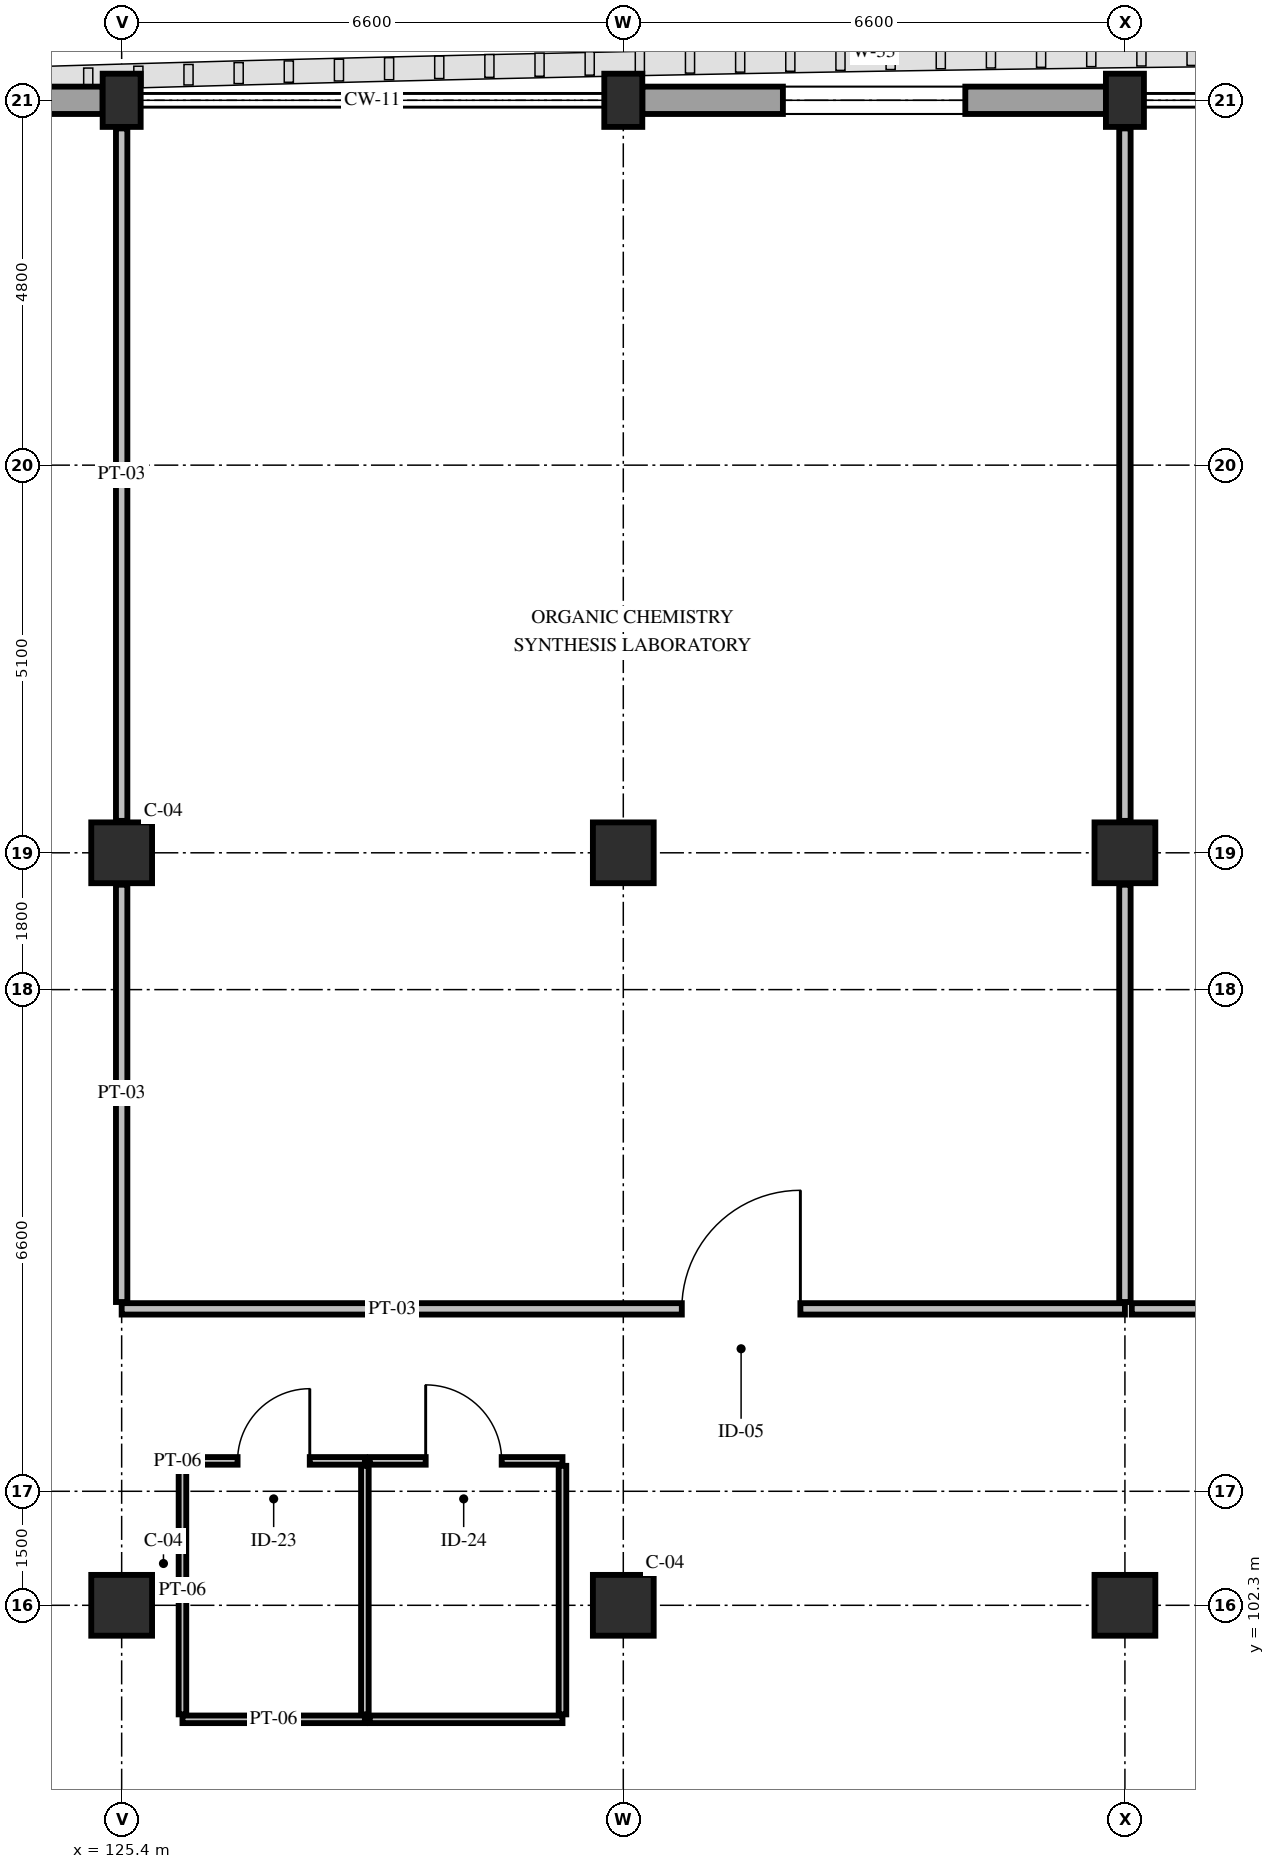
"""IFC4 building model, lengths in metres.
Left out: names, types, materials, properties, quantities, classifications, styles, units other than length and angle.
Written with IfcOpenShell. Run it as: python <this file> out.ifc"""

import sys

from ifc_helpers import new_model, si_unit, direction, frame, frame_2d, origin, origin_2d, place, context, subcontext, project, spatial, rectangle, extrude, element, fill, save


model = new_model("IFC4")
c1 = context("Model", 3, precision=1e-05, world=origin(), true_north=direction((0.0, 1.0)))
c2 = subcontext(c1, "Body", "Model", "MODEL_VIEW")
j1 = project(units=[si_unit("LENGTHUNIT", "METRE"), si_unit("PLANEANGLEUNIT", "RADIAN")], contexts=[c1])
p1 = place(None, origin())
s1 = spatial("IfcSite", under=j1, at=p1, CompositionType="ELEMENT")
p2 = place(p1, origin())
s2 = spatial("IfcBuilding", under=s1, at=p2, CompositionType="ELEMENT")
p3 = place(p2, frame((0.0, 0.0, 5.4)))
s3 = spatial("IfcBuildingStorey", under=s2, at=p3, CompositionType="ELEMENT", Elevation=5.4)
for number, where, z_axis, x_axis in (
    (1, (125.4, 102.3, 0.0), (0.0, 0.0, 1.0), (1.0, 0.0, 0.0)),
    (2, (125.4, 112.2, 0.0), (0.0, 0.0, 1.0), (1.0, 0.0, 0.0)),
):
    element("IfcColumn", number, at=place(p3, frame(where, z_axis=z_axis, x_axis=x_axis)), inside=s3, PredefinedType="COLUMN", context=c2, shape_type="SweptSolid", body=[
        extrude(rectangle(XDim=0.8, YDim=0.8, at=origin_2d()), origin(), (0.0, 0.0, 1.0), 4.8),
    ])
p4 = place(p3, frame((125.4, 122.1, 0.0), z_axis=(0.0, 0.0, 1.0), x_axis=(1.0, 0.0, 0.0)))
e3 = element("IfcColumn", 3, at=p4, inside=s3, PredefinedType="PILASTER", context=c2, shape_type="SweptSolid", body=[
    extrude(rectangle(XDim=0.5, YDim=0.7, at=origin_2d()), origin(), (0.0, 0.0, 1.0), 4.8),
])
for number, where, z_axis, x_axis in (
    (4, (132.0, 102.3, 0.0), (0.0, 0.0, 1.0), (1.0, 0.0, 0.0)),
    (5, (132.0, 112.2, 0.0), (0.0, 0.0, 1.0), (1.0, 0.0, 0.0)),
):
    element("IfcColumn", number, at=place(p3, frame(where, z_axis=z_axis, x_axis=x_axis)), inside=s3, PredefinedType="COLUMN", context=c2, shape_type="SweptSolid", body=[
        extrude(rectangle(XDim=0.8, YDim=0.8, at=origin_2d()), origin(), (0.0, 0.0, 1.0), 4.8),
    ])
p5 = place(p3, frame((132.0, 122.1, 0.0), z_axis=(0.0, 0.0, 1.0), x_axis=(1.0, 0.0, 0.0)))
e6 = element("IfcColumn", 6, at=p5, inside=s3, PredefinedType="PILASTER", context=c2, shape_type="SweptSolid", body=[
    extrude(rectangle(XDim=0.5, YDim=0.7, at=origin_2d()), origin(), (0.0, 0.0, 1.0), 4.8),
])
for number, where, z_axis, x_axis in (
    (7, (138.6, 102.3, 0.0), (0.0, 0.0, 1.0), (1.0, 0.0, 0.0)),
    (8, (138.6, 112.2, 0.0), (0.0, 0.0, 1.0), (1.0, 0.0, 0.0)),
):
    element("IfcColumn", number, at=place(p3, frame(where, z_axis=z_axis, x_axis=x_axis)), inside=s3, PredefinedType="COLUMN", context=c2, shape_type="SweptSolid", body=[
        extrude(rectangle(XDim=0.8, YDim=0.8, at=origin_2d()), origin(), (0.0, 0.0, 1.0), 4.8),
    ])
p6 = place(p3, frame((138.6, 122.1, 0.0), z_axis=(0.0, 0.0, 1.0), x_axis=(1.0, 0.0, 0.0)))
e9 = element("IfcColumn", 9, at=p6, inside=s3, PredefinedType="PILASTER", context=c2, shape_type="SweptSolid", body=[
    extrude(rectangle(XDim=0.5, YDim=0.7, at=origin_2d()), origin(), (0.0, 0.0, 1.0), 4.8),
])
p7 = place(p3, frame((119.15, 122.1, 0.0), z_axis=(0.0, 0.0, 1.0), x_axis=(1.0, 0.0, 0.0)))
e10 = element("IfcWall", 10, at=p7, inside=s3, PredefinedType="STANDARD", context=c2, shape_type="SweptSolid", body=[
    extrude(rectangle(XDim=6.0, YDim=0.36, at=frame_2d((3.0, 0.0))), origin(), (0.0, 0.0, 1.0), 3.78),
])
p8 = place(p7, frame((1.8, 0.0, 0.85)))
e11 = element("IfcOpeningElement", 11, at=p8, cuts=e10, PredefinedType="OPENING", context=c2, shape_type="SweptSolid", body=[
    extrude(rectangle(XDim=2.4, YDim=1.88, at=frame_2d((1.2, 0.94))), frame((0.0, 0.195, 0.0), z_axis=(0.0, -1.0, 0.0), x_axis=(1.0, 0.0, 0.0)), (0.0, 0.0, 1.0), 0.39),
])
p9 = place(p3, frame((132.25, 122.1, 0.0), z_axis=(0.0, 0.0, 1.0), x_axis=(1.0, 0.0, 0.0)))
e12 = element("IfcWall", 12, at=p9, inside=s3, PredefinedType="STANDARD", context=c2, shape_type="SweptSolid", body=[
    extrude(rectangle(XDim=6.1, YDim=0.36, at=frame_2d((3.05, 0.0))), origin(), (0.0, 0.0, 1.0), 3.78),
])
p10 = place(p9, frame((1.85, 0.0, 0.85)))
e13 = element("IfcOpeningElement", 13, at=p10, cuts=e12, PredefinedType="OPENING", context=c2, shape_type="SweptSolid", body=[
    extrude(rectangle(XDim=2.4, YDim=1.88, at=frame_2d((1.2, 0.94))), frame((0.0, 0.195, 0.0), z_axis=(0.0, -1.0, 0.0), x_axis=(1.0, 0.0, 0.0)), (0.0, 0.0, 1.0), 0.39),
])
p11 = place(p3, frame((126.2, 100.8, 0.0), z_axis=(0.0, 0.0, 1.0), x_axis=(1.0, 0.0, 0.0)))
e14 = element("IfcWall", 14, at=p11, inside=s3, PredefinedType="PARTITIONING", context=c2, shape_type="SweptSolid", body=[
    extrude(rectangle(XDim=2.4, YDim=0.1, at=frame_2d((1.2, 0.0))), origin(), (0.0, 0.0, 1.0), 4.44),
])
p12 = place(p3, frame((126.2, 104.2, 0.0), z_axis=(0.0, 0.0, 1.0), x_axis=(1.0, 0.0, 0.0)))
e15 = element("IfcWall", 15, at=p12, inside=s3, PredefinedType="PARTITIONING", context=c2, shape_type="SweptSolid", body=[
    extrude(rectangle(XDim=2.4, YDim=0.1, at=frame_2d((1.2, 0.0))), origin(), (0.0, 0.0, 1.0), 4.245),
])
p13 = place(p12, frame((0.725, 0.0, 0.0)))
e16 = element("IfcOpeningElement", 16, at=p13, cuts=e15, PredefinedType="OPENING", context=c2, shape_type="SweptSolid", body=[
    extrude(rectangle(XDim=0.95, YDim=2.15, at=frame_2d((0.475, 1.075))), frame((0.0, 0.065, 0.0), z_axis=(0.0, -1.0, 0.0), x_axis=(1.0, 0.0, 0.0)), (0.0, 0.0, 1.0), 0.13),
])
for number, where, z_axis, x_axis in (
    (17, (126.2, 100.865, 0.0), (0.0, 0.0, 1.0), (0.0, 1.0, 0.0)),
    (18, (128.6, 100.865, 0.0), (0.0, 0.0, 1.0), (0.0, 1.0, 0.0)),
):
    element("IfcWall", number, at=place(p3, frame(where, z_axis=z_axis, x_axis=x_axis)), inside=s3, PredefinedType="PARTITIONING", context=c2, shape_type="SweptSolid", body=[
        extrude(rectangle(XDim=3.27, YDim=0.1, at=frame_2d((1.635, 0.0))), origin(), (0.0, 0.0, 1.0), 4.065),
    ])
p14 = place(p3, frame((128.665, 100.8, 0.0), z_axis=(0.0, 0.0, 1.0), x_axis=(1.0, 0.0, 0.0)))
e19 = element("IfcWall", 19, at=p14, inside=s3, PredefinedType="PARTITIONING", context=c2, shape_type="SweptSolid", body=[
    extrude(rectangle(XDim=2.535, YDim=0.1, at=frame_2d((1.268, 0.0))), origin(), (0.0, 0.0, 1.0), 4.44),
])
p15 = place(p3, frame((128.665, 104.2, 0.0), z_axis=(0.0, 0.0, 1.0), x_axis=(1.0, 0.0, 0.0)))
e20 = element("IfcWall", 20, at=p15, inside=s3, PredefinedType="PARTITIONING", context=c2, shape_type="SweptSolid", body=[
    extrude(rectangle(XDim=2.535, YDim=0.1, at=frame_2d((1.268, 0.0))), origin(), (0.0, 0.0, 1.0), 4.245),
])
p16 = place(p15, frame((0.735, 0.0, 0.0)))
e21 = element("IfcOpeningElement", 21, at=p16, cuts=e20, PredefinedType="OPENING", context=c2, shape_type="SweptSolid", body=[
    extrude(rectangle(XDim=1.0, YDim=2.15, at=frame_2d((0.5, 1.075))), frame((0.0, 0.065, 0.0), z_axis=(0.0, -1.0, 0.0), x_axis=(1.0, 0.0, 0.0)), (0.0, 0.0, 1.0), 0.13),
])
p17 = place(p3, frame((131.2, 100.865, 0.0), z_axis=(0.0, 0.0, 1.0), x_axis=(0.0, 1.0, 0.0)))
e22 = element("IfcWall", 22, at=p17, inside=s3, PredefinedType="PARTITIONING", context=c2, shape_type="SweptSolid", body=[
    extrude(rectangle(XDim=3.27, YDim=0.1, at=frame_2d((1.635, 0.0))), origin(), (0.0, 0.0, 1.0), 4.065),
])
p18 = place(p3, frame((125.4, 106.2, 0.0), z_axis=(0.0, 0.0, 1.0), x_axis=(1.0, 0.0, 0.0)))
e23 = element("IfcWall", 23, at=p18, inside=s3, PredefinedType="PARTITIONING", context=c2, shape_type="SweptSolid", body=[
    extrude(rectangle(XDim=13.2, YDim=0.15, at=frame_2d((6.6, 0.0))), origin(), (0.0, 0.0, 1.0), 3.78),
])
p19 = place(p18, frame((7.37, 0.0, 0.0)))
e24 = element("IfcOpeningElement", 24, at=p19, cuts=e23, PredefinedType="OPENING", context=c2, shape_type="SweptSolid", body=[
    extrude(rectangle(XDim=1.56, YDim=2.3, at=frame_2d((0.78, 1.15))), frame((0.0, 0.09, 0.0), z_axis=(0.0, -1.0, 0.0), x_axis=(1.0, 0.0, 0.0)), (0.0, 0.0, 1.0), 0.18),
])
p20 = place(p3, frame((125.4, 106.29, 0.0), z_axis=(0.0, 0.0, 1.0), x_axis=(0.0, 1.0, 0.0)))
e25 = element("IfcWall", 25, at=p20, inside=s3, PredefinedType="PARTITIONING", context=c2, shape_type="SweptSolid", body=[
    extrude(rectangle(XDim=5.49, YDim=0.15, at=frame_2d((2.745, 0.0))), origin(), (0.0, 0.0, 1.0), 3.78),
])
p21 = place(p3, frame((125.4, 112.62, 0.0), z_axis=(0.0, 0.0, 1.0), x_axis=(0.0, 1.0, 0.0)))
e26 = element("IfcWall", 26, at=p21, inside=s3, PredefinedType="PARTITIONING", context=c2, shape_type="SweptSolid", body=[
    extrude(rectangle(XDim=9.11, YDim=0.15, at=frame_2d((4.555, 0.0))), origin(), (0.0, 0.0, 1.0), 3.78),
])
p22 = place(p3, frame((138.6, 106.29, 0.0), z_axis=(0.0, 0.0, 1.0), x_axis=(0.0, 1.0, 0.0)))
e27 = element("IfcWall", 27, at=p22, inside=s3, PredefinedType="PARTITIONING", context=c2, shape_type="SweptSolid", body=[
    extrude(rectangle(XDim=5.49, YDim=0.15, at=frame_2d((2.745, 0.0))), origin(), (0.0, 0.0, 1.0), 3.78),
])
p23 = place(p3, frame((138.6, 112.62, 0.0), z_axis=(0.0, 0.0, 1.0), x_axis=(0.0, 1.0, 0.0)))
e28 = element("IfcWall", 28, at=p23, inside=s3, PredefinedType="PARTITIONING", context=c2, shape_type="SweptSolid", body=[
    extrude(rectangle(XDim=9.11, YDim=0.15, at=frame_2d((4.555, 0.0))), origin(), (0.0, 0.0, 1.0), 3.78),
])
p24 = place(p3, frame((138.69, 106.2, 0.0), z_axis=(0.0, 0.0, 1.0), x_axis=(1.0, 0.0, 0.0)))
e29 = element("IfcWall", 29, at=p24, inside=s3, PredefinedType="PARTITIONING", context=c2, shape_type="SweptSolid", body=[
    extrude(rectangle(XDim=12.31, YDim=0.15, at=frame_2d((6.155, 0.0))), origin(), (0.0, 0.0, 1.0), 3.78),
])
p25 = place(p24, frame((7.31, 0.0, 0.0)))
e30 = element("IfcOpeningElement", 30, at=p25, cuts=e29, PredefinedType="OPENING", context=c2, shape_type="SweptSolid", body=[
    extrude(rectangle(XDim=1.5, YDim=2.25, at=frame_2d((0.75, 1.125))), frame((0.0, 0.09, 0.0), z_axis=(0.0, -1.0, 0.0), x_axis=(1.0, 0.0, 0.0)), (0.0, 0.0, 1.0), 0.18),
])
p26 = place(p10, origin())
e31 = element("IfcWindow", 31, at=p26, inside=s3, PartitioningType="DOUBLE_PANEL_VERTICAL", PredefinedType="WINDOW", context=c2, shape_type="SweptSolid", body=[
    extrude(rectangle(XDim=2.4, YDim=1.88, at=frame_2d((1.2, 0.94))), frame((0.0, 0.03, 0.0), z_axis=(0.0, -1.0, 0.0), x_axis=(1.0, 0.0, 0.0)), (0.0, 0.0, 1.0), 0.06),
])
fill(e13, e31)
p27 = place(p13, origin())
e32 = element("IfcDoor", 32, at=p27, inside=s3, OperationType="SINGLE_SWING_RIGHT", PredefinedType="DOOR", context=c2, shape_type="SweptSolid", body=[
    extrude(rectangle(XDim=0.95, YDim=2.15, at=frame_2d((0.475, 1.075))), frame((0.0, 0.025, 0.0), z_axis=(0.0, -1.0, 0.0), x_axis=(1.0, 0.0, 0.0)), (0.0, 0.0, 1.0), 0.05),
])
fill(e16, e32)
p28 = place(p16, origin())
e33 = element("IfcDoor", 33, at=p28, inside=s3, OperationType="SINGLE_SWING_LEFT", PredefinedType="DOOR", context=c2, shape_type="SweptSolid", body=[
    extrude(rectangle(XDim=1.0, YDim=2.15, at=frame_2d((0.5, 1.075))), frame((0.0, 0.025, 0.0), z_axis=(0.0, -1.0, 0.0), x_axis=(1.0, 0.0, 0.0)), (0.0, 0.0, 1.0), 0.05),
])
fill(e21, e33)
p29 = place(p19, origin())
e34 = element("IfcDoor", 34, at=p29, inside=s3, OperationType="SINGLE_SWING_RIGHT", PredefinedType="DOOR", context=c2, shape_type="SweptSolid", body=[
    extrude(rectangle(XDim=1.56, YDim=2.3, at=frame_2d((0.78, 1.15))), frame((0.0, 0.025, 0.0), z_axis=(0.0, -1.0, 0.0), x_axis=(1.0, 0.0, 0.0)), (0.0, 0.0, 1.0), 0.05),
])
fill(e24, e34)
save(model, sys.argv[1])
